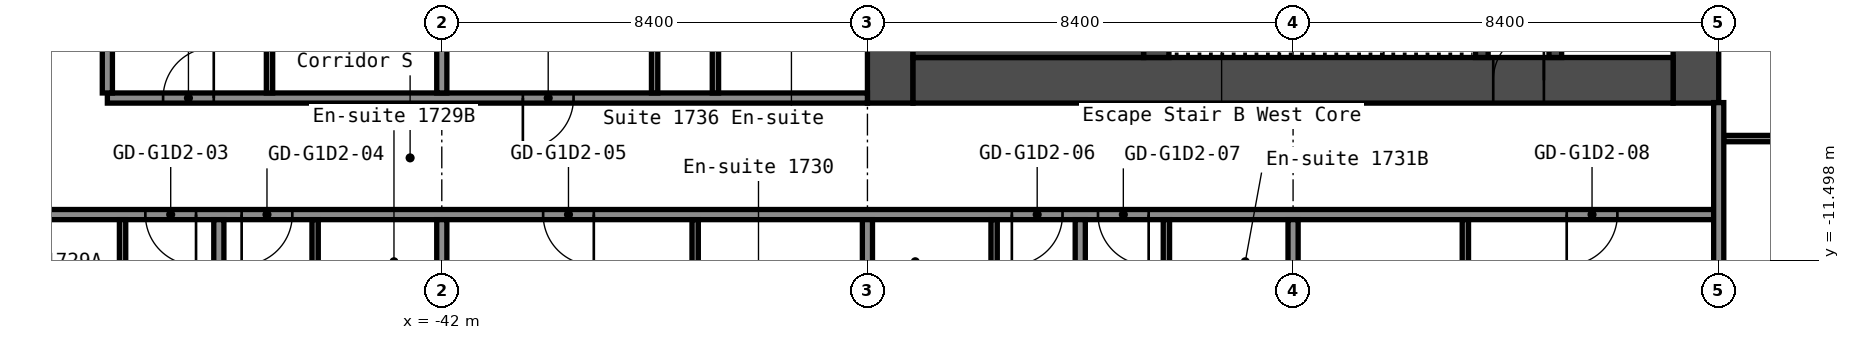
"""IFC4 building model, lengths in metres.
Left out: names, types, materials, properties, quantities, classifications, styles, units other than length and angle.
Written with IfcOpenShell. Run it as: python <this file> out.ifc"""

import sys

from ifc_helpers import new_model, si_unit, direction, frame, frame_2d, origin, place, context, subcontext, project, spatial, rectangle, extrude, element, fill, save


model = new_model("IFC4")
c1 = context("Model", 3, precision=1e-05, world=origin(), true_north=direction((0.0, 1.0)))
c2 = subcontext(c1, "Body", "Model", "MODEL_VIEW")
j1 = project(units=[si_unit("LENGTHUNIT", "METRE"), si_unit("PLANEANGLEUNIT", "RADIAN")], contexts=[c1])
p1 = place(None, origin())
s1 = spatial("IfcSite", under=j1, at=p1, CompositionType="ELEMENT")
p2 = place(p1, origin())
s2 = spatial("IfcBuilding", under=s1, at=p2, CompositionType="ELEMENT")
p3 = place(p2, frame((0.0, 0.0, 61.4)))
s3 = spatial("IfcBuildingStorey", under=s2, at=p3, CompositionType="ELEMENT", Elevation=61.4)
p4 = place(p3, frame((-17.25, -8.4, 0.0), z_axis=(0.0, 0.0, 1.0), x_axis=(0.0, 1.0, 0.0)))
e1 = element("IfcWall", 1, at=p4, inside=s3, PredefinedType="SHEAR", context=c2, shape_type="SweptSolid", body=[
    extrude(rectangle(XDim=16.8, YDim=0.9, at=frame_2d((8.4, 0.0))), origin(), (0.0, 0.0, 1.0), 2.9),
])
p5 = place(p4, frame((12.75, 0.0, 0.0)))
e2 = element("IfcOpeningElement", 2, at=p5, cuts=e1, PredefinedType="OPENING", context=c2, shape_type="SweptSolid", body=[
    extrude(rectangle(XDim=1.2, YDim=2.1, at=frame_2d((0.6, 1.05))), frame((0.0, 0.46, 0.0), z_axis=(0.0, -1.0, 0.0), x_axis=(1.0, 0.0, 0.0)), (0.0, 0.0, 1.0), 0.92),
])
p6 = place(p4, frame((2.85, 0.0, 0.0)))
e3 = element("IfcOpeningElement", 3, at=p6, cuts=e1, PredefinedType="OPENING", context=c2, shape_type="SweptSolid", body=[
    extrude(rectangle(XDim=1.2, YDim=2.1, at=frame_2d((0.6, 1.05))), frame((0.0, 0.46, 0.0), z_axis=(0.0, -1.0, 0.0), x_axis=(1.0, 0.0, 0.0)), (0.0, 0.0, 1.0), 0.92),
])
p7 = place(p3, frame((-33.15, -8.4, 0.0), z_axis=(0.0, 0.0, 1.0), x_axis=(0.0, 1.0, 0.0)))
e4 = element("IfcWall", 4, at=p7, inside=s3, PredefinedType="SHEAR", context=c2, shape_type="SweptSolid", body=[
    extrude(rectangle(XDim=16.8, YDim=0.9, at=frame_2d((8.4, 0.0))), origin(), (0.0, 0.0, 1.0), 2.9),
])
p8 = place(p3, frame((-32.7, -7.95, 0.0), z_axis=(0.0, 0.0, 1.0), x_axis=(1.0, 0.0, 0.0)))
e5 = element("IfcWall", 5, at=p8, inside=s3, PredefinedType="SHEAR", context=c2, shape_type="SweptSolid", body=[
    extrude(rectangle(XDim=15.0, YDim=0.9, at=frame_2d((7.5, 0.0))), origin(), (0.0, 0.0, 1.0), 2.9),
])
p9 = place(p8, frame((11.45, 0.0, 0.0)))
e6 = element("IfcOpeningElement", 6, at=p9, cuts=e5, PredefinedType="OPENING", context=c2, shape_type="SweptSolid", body=[
    extrude(rectangle(XDim=1.0, YDim=2.1, at=frame_2d((0.5, 1.05))), frame((0.0, 0.46, 0.0), z_axis=(0.0, -1.0, 0.0), x_axis=(1.0, 0.0, 0.0)), (0.0, 0.0, 1.0), 0.92),
])
p10 = place(p3, frame((-20.025, -7.5, 0.0), z_axis=(0.0, 0.0, 1.0), x_axis=(0.0, 1.0, 0.0)))
e7 = element("IfcWall", 7, at=p10, inside=s3, PredefinedType="SHEAR", context=c2, shape_type="SweptSolid", body=[
    extrude(rectangle(XDim=6.3, YDim=0.25, at=frame_2d((3.15, 0.0))), origin(), (0.0, 0.0, 1.0), 2.9),
])
p11 = place(p10, frame((2.4, 0.0, 0.0)))
e8 = element("IfcOpeningElement", 8, at=p11, cuts=e7, PredefinedType="OPENING", context=c2, shape_type="SweptSolid", body=[
    extrude(rectangle(XDim=1.0, YDim=2.1, at=frame_2d((0.5, 1.05))), frame((0.0, 0.135, 0.0), z_axis=(0.0, -1.0, 0.0), x_axis=(1.0, 0.0, 0.0)), (0.0, 0.0, 1.0), 0.27),
])
p12 = place(p3, frame((-21.475, -7.5, 0.0), z_axis=(0.0, 0.0, 1.0), x_axis=(0.0, 1.0, 0.0)))
e9 = element("IfcWall", 9, at=p12, inside=s3, PredefinedType="SHEAR", context=c2, shape_type="SweptSolid", body=[
    extrude(rectangle(XDim=3.75, YDim=0.25, at=frame_2d((1.875, 0.0))), origin(), (0.0, 0.0, 1.0), 2.9),
])
p13 = place(p12, frame((1.3, 0.0, 0.0)))
e10 = element("IfcOpeningElement", 10, at=p13, cuts=e9, PredefinedType="OPENING", context=c2, shape_type="SweptSolid", body=[
    extrude(rectangle(XDim=1.2, YDim=2.1, at=frame_2d((0.6, 1.05))), frame((0.0, 0.135, 0.0), z_axis=(0.0, -1.0, 0.0), x_axis=(1.0, 0.0, 0.0)), (0.0, 0.0, 1.0), 0.27),
])
p14 = place(p3, frame((-27.9, -7.5, 0.0), z_axis=(0.0, 0.0, 1.0), x_axis=(0.0, 1.0, 0.0)))
e11 = element("IfcWall", 11, at=p14, inside=s3, PredefinedType="SHEAR", context=c2, shape_type="SweptSolid", body=[
    extrude(rectangle(XDim=3.75, YDim=0.5, at=frame_2d((1.875, 0.0))), origin(), (0.0, 0.0, 1.0), 2.9),
])
p15 = place(p3, frame((-32.7, -6.75, 0.0), z_axis=(0.0, 0.0, 1.0), x_axis=(1.0, 0.0, 0.0)))
e12 = element("IfcWall", 12, at=p15, inside=s3, PredefinedType="SHEAR", context=c2, shape_type="SweptSolid", body=[
    extrude(rectangle(XDim=4.55, YDim=1.5, at=frame_2d((2.275, 0.0))), origin(), (0.0, 0.0, 1.0), 2.9),
])
p16 = place(p3, frame((-51.1, -10.6, 0.0), z_axis=(0.0, 0.0, 1.0), x_axis=(1.0, 0.0, 0.0)))
e13 = element("IfcWall", 13, at=p16, inside=s3, PredefinedType="PARTITIONING", context=c2, shape_type="SweptSolid", body=[
    extrude(rectangle(XDim=34.3, YDim=0.2, at=frame_2d((17.15, 0.0))), origin(), (0.0, 0.0, 1.0), 2.9),
])
p17 = place(p16, frame((3.25, 0.0, 0.0)))
e14 = element("IfcOpeningElement", 14, at=p17, cuts=e13, PredefinedType="OPENING", context=c2, shape_type="SweptSolid", body=[
    extrude(rectangle(XDim=1.0, YDim=2.1, at=frame_2d((0.5, 1.05))), frame((0.0, 0.11, 0.0), z_axis=(0.0, -1.0, 0.0), x_axis=(1.0, 0.0, 0.0)), (0.0, 0.0, 1.0), 0.22),
])
p18 = place(p16, frame((5.15, 0.0, 0.0)))
e15 = element("IfcOpeningElement", 15, at=p18, cuts=e13, PredefinedType="OPENING", context=c2, shape_type="SweptSolid", body=[
    extrude(rectangle(XDim=1.0, YDim=2.1, at=frame_2d((0.5, 1.05))), frame((0.0, 0.11, 0.0), z_axis=(0.0, -1.0, 0.0), x_axis=(1.0, 0.0, 0.0)), (0.0, 0.0, 1.0), 0.22),
])
p19 = place(p16, frame((11.1, 0.0, 0.0)))
e16 = element("IfcOpeningElement", 16, at=p19, cuts=e13, PredefinedType="OPENING", context=c2, shape_type="SweptSolid", body=[
    extrude(rectangle(XDim=1.0, YDim=2.1, at=frame_2d((0.5, 1.05))), frame((0.0, 0.11, 0.0), z_axis=(0.0, -1.0, 0.0), x_axis=(1.0, 0.0, 0.0)), (0.0, 0.0, 1.0), 0.22),
])
p20 = place(p16, frame((20.35, 0.0, 0.0)))
e17 = element("IfcOpeningElement", 17, at=p20, cuts=e13, PredefinedType="OPENING", context=c2, shape_type="SweptSolid", body=[
    extrude(rectangle(XDim=1.0, YDim=2.1, at=frame_2d((0.5, 1.05))), frame((0.0, 0.11, 0.0), z_axis=(0.0, -1.0, 0.0), x_axis=(1.0, 0.0, 0.0)), (0.0, 0.0, 1.0), 0.22),
])
p21 = place(p16, frame((22.05, 0.0, 0.0)))
e18 = element("IfcOpeningElement", 18, at=p21, cuts=e13, PredefinedType="OPENING", context=c2, shape_type="SweptSolid", body=[
    extrude(rectangle(XDim=1.0, YDim=2.1, at=frame_2d((0.5, 1.05))), frame((0.0, 0.11, 0.0), z_axis=(0.0, -1.0, 0.0), x_axis=(1.0, 0.0, 0.0)), (0.0, 0.0, 1.0), 0.22),
])
p22 = place(p16, frame((31.3, 0.0, 0.0)))
e19 = element("IfcOpeningElement", 19, at=p22, cuts=e13, PredefinedType="OPENING", context=c2, shape_type="SweptSolid", body=[
    extrude(rectangle(XDim=1.0, YDim=2.1, at=frame_2d((0.5, 1.05))), frame((0.0, 0.11, 0.0), z_axis=(0.0, -1.0, 0.0), x_axis=(1.0, 0.0, 0.0)), (0.0, 0.0, 1.0), 0.22),
])
p23 = place(p3, frame((-16.7, -9.1, 0.0), z_axis=(0.0, 0.0, 1.0), x_axis=(1.0, 0.0, 0.0)))
e20 = element("IfcWall", 20, at=p23, inside=s3, PredefinedType="PARTITIONING", context=c2, shape_type="SweptSolid", body=[
    extrude(rectangle(XDim=2.337, YDim=0.125, at=frame_2d((1.169, 0.0))), origin(), (0.0, 0.0, 1.0), 2.9),
])
p24 = place(p3, frame((-48.6, -8.3, 0.0), z_axis=(0.0, 0.0, 1.0), x_axis=(1.0, 0.0, 0.0)))
e21 = element("IfcWall", 21, at=p24, inside=s3, PredefinedType="PARTITIONING", context=c2, shape_type="SweptSolid", body=[
    extrude(rectangle(XDim=15.0, YDim=0.2, at=frame_2d((7.5, 0.0))), origin(), (0.0, 0.0, 1.0), 2.9),
])
p25 = place(p24, frame((1.1, 0.0, 0.0)))
e22 = element("IfcOpeningElement", 22, at=p25, cuts=e21, PredefinedType="OPENING", context=c2, shape_type="SweptSolid", body=[
    extrude(rectangle(XDim=1.0, YDim=2.1, at=frame_2d((0.5, 1.05))), frame((0.0, 0.11, 0.0), z_axis=(0.0, -1.0, 0.0), x_axis=(1.0, 0.0, 0.0)), (0.0, 0.0, 1.0), 0.22),
])
p26 = place(p24, frame((8.2, 0.0, 0.0)))
e23 = element("IfcOpeningElement", 23, at=p26, cuts=e21, PredefinedType="OPENING", context=c2, shape_type="SweptSolid", body=[
    extrude(rectangle(XDim=1.0, YDim=2.1, at=frame_2d((0.5, 1.05))), frame((0.0, 0.11, 0.0), z_axis=(0.0, -1.0, 0.0), x_axis=(1.0, 0.0, 0.0)), (0.0, 0.0, 1.0), 0.22),
])
p27 = place(p3, frame((-48.6, -8.2, 0.0), z_axis=(0.0, 0.0, 1.0), x_axis=(0.0, 1.0, 0.0)))
e24 = element("IfcWall", 24, at=p27, inside=s3, PredefinedType="PARTITIONING", context=c2, shape_type="SweptSolid", body=[
    extrude(rectangle(XDim=16.4, YDim=0.2, at=frame_2d((8.2, 0.0))), origin(), (0.0, 0.0, 1.0), 2.9),
])
p28 = place(p3, frame((-48.3, -13.6, 0.0), z_axis=(0.0, 0.0, 1.0), x_axis=(0.0, 1.0, 0.0)))
e25 = element("IfcWall", 25, at=p28, inside=s3, PredefinedType="PARTITIONING", context=c2, shape_type="SweptSolid", body=[
    extrude(rectangle(XDim=2.9, YDim=0.125, at=frame_2d((1.45, 0.0))), origin(), (0.0, 0.0, 1.0), 2.9),
])
p29 = place(p28, frame((0.6, 0.0, 0.0)))
e26 = element("IfcOpeningElement", 26, at=p29, cuts=e25, PredefinedType="OPENING", context=c2, shape_type="SweptSolid", body=[
    extrude(rectangle(XDim=0.8, YDim=2.1, at=frame_2d((0.4, 1.05))), frame((0.0, 0.073, 0.0), z_axis=(0.0, -1.0, 0.0), x_axis=(1.0, 0.0, 0.0)), (0.0, 0.0, 1.0), 0.145),
])
p30 = place(p3, frame((-46.4, -20.3, 0.0), z_axis=(0.0, 0.0, 1.0), x_axis=(0.0, 1.0, 0.0)))
e27 = element("IfcWall", 27, at=p30, inside=s3, PredefinedType="PARTITIONING", context=c2, shape_type="SweptSolid", body=[
    extrude(rectangle(XDim=9.6, YDim=0.2, at=frame_2d((4.8, 0.0))), origin(), (0.0, 0.0, 1.0), 2.9),
])
p31 = place(p3, frame((-45.4, -8.2, 0.0), z_axis=(0.0, 0.0, 1.0), x_axis=(0.0, 1.0, 0.0)))
e28 = element("IfcWall", 28, at=p31, inside=s3, PredefinedType="PARTITIONING", context=c2, shape_type="SweptSolid", body=[
    extrude(rectangle(XDim=3.3, YDim=0.125, at=frame_2d((1.65, 0.0))), origin(), (0.0, 0.0, 1.0), 2.9),
])
p32 = place(p3, frame((-44.5, -13.6, 0.0), z_axis=(0.0, 0.0, 1.0), x_axis=(0.0, 1.0, 0.0)))
e29 = element("IfcWall", 29, at=p32, inside=s3, PredefinedType="PARTITIONING", context=c2, shape_type="SweptSolid", body=[
    extrude(rectangle(XDim=2.9, YDim=0.125, at=frame_2d((1.45, 0.0))), origin(), (0.0, 0.0, 1.0), 2.9),
])
p33 = place(p32, frame((0.6, 0.0, 0.0)))
e30 = element("IfcOpeningElement", 30, at=p33, cuts=e29, PredefinedType="OPENING", context=c2, shape_type="SweptSolid", body=[
    extrude(rectangle(XDim=0.8, YDim=2.1, at=frame_2d((0.4, 1.05))), frame((0.0, 0.073, 0.0), z_axis=(0.0, -1.0, 0.0), x_axis=(1.0, 0.0, 0.0)), (0.0, 0.0, 1.0), 0.145),
])
p34 = place(p3, frame((-42.0, -20.3, 0.0), z_axis=(0.0, 0.0, 1.0), x_axis=(0.0, 1.0, 0.0)))
e31 = element("IfcWall", 31, at=p34, inside=s3, PredefinedType="PARTITIONING", context=c2, shape_type="SweptSolid", body=[
    extrude(rectangle(XDim=9.6, YDim=0.2, at=frame_2d((4.8, 0.0))), origin(), (0.0, 0.0, 1.0), 2.9),
])
p35 = place(p3, frame((-42.0, -8.2, 0.0), z_axis=(0.0, 0.0, 1.0), x_axis=(0.0, 1.0, 0.0)))
e32 = element("IfcWall", 32, at=p35, inside=s3, PredefinedType="PARTITIONING", context=c2, shape_type="SweptSolid", body=[
    extrude(rectangle(XDim=16.4, YDim=0.2, at=frame_2d((8.2, 0.0))), origin(), (0.0, 0.0, 1.0), 2.9),
])
p36 = place(p3, frame((-37.8, -8.2, 0.0), z_axis=(0.0, 0.0, 1.0), x_axis=(0.0, 1.0, 0.0)))
e33 = element("IfcWall", 33, at=p36, inside=s3, PredefinedType="PARTITIONING", context=c2, shape_type="SweptSolid", body=[
    extrude(rectangle(XDim=8.1, YDim=0.125, at=frame_2d((4.05, 0.0))), origin(), (0.0, 0.0, 1.0), 2.9),
])
p37 = place(p36, frame((4.05, 0.0, 0.0)))
e34 = element("IfcOpeningElement", 34, at=p37, cuts=e33, PredefinedType="OPENING", context=c2, shape_type="SweptSolid", body=[
    extrude(rectangle(XDim=0.9, YDim=2.1, at=frame_2d((0.45, 1.05))), frame((0.0, 0.073, 0.0), z_axis=(0.0, -1.0, 0.0), x_axis=(1.0, 0.0, 0.0)), (0.0, 0.0, 1.0), 0.145),
])
p38 = place(p3, frame((-37.0, -14.0, 0.0), z_axis=(0.0, 0.0, 1.0), x_axis=(0.0, 1.0, 0.0)))
e35 = element("IfcWall", 35, at=p38, inside=s3, PredefinedType="PARTITIONING", context=c2, shape_type="SweptSolid", body=[
    extrude(rectangle(XDim=3.3, YDim=0.125, at=frame_2d((1.65, 0.0))), origin(), (0.0, 0.0, 1.0), 2.9),
])
p39 = place(p3, frame((-36.6, -8.2, 0.0), z_axis=(0.0, 0.0, 1.0), x_axis=(0.0, 1.0, 0.0)))
e36 = element("IfcWall", 36, at=p39, inside=s3, PredefinedType="PARTITIONING", context=c2, shape_type="SweptSolid", body=[
    extrude(rectangle(XDim=3.1, YDim=0.125, at=frame_2d((1.55, 0.0))), origin(), (0.0, 0.0, 1.0), 2.9),
])
p40 = place(p3, frame((-33.6, -20.3, 0.0), z_axis=(0.0, 0.0, 1.0), x_axis=(0.0, 1.0, 0.0)))
e37 = element("IfcWall", 37, at=p40, inside=s3, PredefinedType="PARTITIONING", context=c2, shape_type="SweptSolid", body=[
    extrude(rectangle(XDim=9.6, YDim=0.2, at=frame_2d((4.8, 0.0))), origin(), (0.0, 0.0, 1.0), 2.9),
])
p41 = place(p3, frame((-31.1, -13.6, 0.0), z_axis=(0.0, 0.0, 1.0), x_axis=(0.0, 1.0, 0.0)))
e38 = element("IfcWall", 38, at=p41, inside=s3, PredefinedType="PARTITIONING", context=c2, shape_type="SweptSolid", body=[
    extrude(rectangle(XDim=2.9, YDim=0.125, at=frame_2d((1.45, 0.0))), origin(), (0.0, 0.0, 1.0), 2.9),
])
p42 = place(p41, frame((0.6, 0.0, 0.0)))
e39 = element("IfcOpeningElement", 39, at=p42, cuts=e38, PredefinedType="OPENING", context=c2, shape_type="SweptSolid", body=[
    extrude(rectangle(XDim=0.8, YDim=2.1, at=frame_2d((0.4, 1.05))), frame((0.0, 0.073, 0.0), z_axis=(0.0, -1.0, 0.0), x_axis=(1.0, 0.0, 0.0)), (0.0, 0.0, 1.0), 0.145),
])
p43 = place(p3, frame((-29.4, -20.3, 0.0), z_axis=(0.0, 0.0, 1.0), x_axis=(0.0, 1.0, 0.0)))
e40 = element("IfcWall", 40, at=p43, inside=s3, PredefinedType="PARTITIONING", context=c2, shape_type="SweptSolid", body=[
    extrude(rectangle(XDim=9.6, YDim=0.2, at=frame_2d((4.8, 0.0))), origin(), (0.0, 0.0, 1.0), 2.9),
])
p44 = place(p3, frame((-27.7, -13.6, 0.0), z_axis=(0.0, 0.0, 1.0), x_axis=(0.0, 1.0, 0.0)))
e41 = element("IfcWall", 41, at=p44, inside=s3, PredefinedType="PARTITIONING", context=c2, shape_type="SweptSolid", body=[
    extrude(rectangle(XDim=2.9, YDim=0.125, at=frame_2d((1.45, 0.0))), origin(), (0.0, 0.0, 1.0), 2.9),
])
p45 = place(p44, frame((0.6, 0.0, 0.0)))
e42 = element("IfcOpeningElement", 42, at=p45, cuts=e41, PredefinedType="OPENING", context=c2, shape_type="SweptSolid", body=[
    extrude(rectangle(XDim=0.8, YDim=2.1, at=frame_2d((0.4, 1.05))), frame((0.0, 0.073, 0.0), z_axis=(0.0, -1.0, 0.0), x_axis=(1.0, 0.0, 0.0)), (0.0, 0.0, 1.0), 0.145),
])
p46 = place(p3, frame((-25.2, -20.3, 0.0), z_axis=(0.0, 0.0, 1.0), x_axis=(0.0, 1.0, 0.0)))
e43 = element("IfcWall", 43, at=p46, inside=s3, PredefinedType="PARTITIONING", context=c2, shape_type="SweptSolid", body=[
    extrude(rectangle(XDim=9.6, YDim=0.2, at=frame_2d((4.8, 0.0))), origin(), (0.0, 0.0, 1.0), 2.9),
])
p47 = place(p3, frame((-21.8, -14.0, 0.0), z_axis=(0.0, 0.0, 1.0), x_axis=(0.0, 1.0, 0.0)))
e44 = element("IfcWall", 44, at=p47, inside=s3, PredefinedType="PARTITIONING", context=c2, shape_type="SweptSolid", body=[
    extrude(rectangle(XDim=3.3, YDim=0.125, at=frame_2d((1.65, 0.0))), origin(), (0.0, 0.0, 1.0), 2.9),
])
p48 = place(p3, frame((-16.8, -20.3, 0.0), z_axis=(0.0, 0.0, 1.0), x_axis=(0.0, 1.0, 0.0)))
e45 = element("IfcWall", 45, at=p48, inside=s3, PredefinedType="PARTITIONING", context=c2, shape_type="SweptSolid", body=[
    extrude(rectangle(XDim=11.91, YDim=0.2, at=frame_2d((5.955, 0.0))), origin(), (0.0, 0.0, 1.0), 2.9),
])
p49 = place(p9, origin())
e46 = element("IfcDoor", 46, at=p49, inside=s3, OperationType="SINGLE_SWING_LEFT", PredefinedType="DOOR", context=c2, shape_type="SweptSolid", body=[
    extrude(rectangle(XDim=1.0, YDim=2.1, at=frame_2d((0.5, 1.05))), frame((0.0, 0.025, 0.0), z_axis=(0.0, -1.0, 0.0), x_axis=(1.0, 0.0, 0.0)), (0.0, 0.0, 1.0), 0.05),
])
fill(e6, e46)
p50 = place(p17, origin())
e47 = element("IfcDoor", 47, at=p50, inside=s3, OperationType="SINGLE_SWING_RIGHT", PredefinedType="DOOR", context=c2, shape_type="SweptSolid", body=[
    extrude(rectangle(XDim=1.0, YDim=2.1, at=frame_2d((0.5, 1.05))), frame((0.0, 0.025, 0.0), z_axis=(0.0, -1.0, 0.0), x_axis=(1.0, 0.0, 0.0)), (0.0, 0.0, 1.0), 0.05),
])
fill(e14, e47)
p51 = place(p18, origin())
e48 = element("IfcDoor", 48, at=p51, inside=s3, OperationType="SINGLE_SWING_LEFT", PredefinedType="DOOR", context=c2, shape_type="SweptSolid", body=[
    extrude(rectangle(XDim=1.0, YDim=2.1, at=frame_2d((0.5, 1.05))), frame((0.0, 0.025, 0.0), z_axis=(0.0, -1.0, 0.0), x_axis=(1.0, 0.0, 0.0)), (0.0, 0.0, 1.0), 0.05),
])
fill(e15, e48)
p52 = place(p19, origin())
e49 = element("IfcDoor", 49, at=p52, inside=s3, OperationType="SINGLE_SWING_RIGHT", PredefinedType="DOOR", context=c2, shape_type="SweptSolid", body=[
    extrude(rectangle(XDim=1.0, YDim=2.1, at=frame_2d((0.5, 1.05))), frame((0.0, 0.025, 0.0), z_axis=(0.0, -1.0, 0.0), x_axis=(1.0, 0.0, 0.0)), (0.0, 0.0, 1.0), 0.05),
])
fill(e16, e49)
p53 = place(p20, origin())
e50 = element("IfcDoor", 50, at=p53, inside=s3, OperationType="SINGLE_SWING_LEFT", PredefinedType="DOOR", context=c2, shape_type="SweptSolid", body=[
    extrude(rectangle(XDim=1.0, YDim=2.1, at=frame_2d((0.5, 1.05))), frame((0.0, 0.025, 0.0), z_axis=(0.0, -1.0, 0.0), x_axis=(1.0, 0.0, 0.0)), (0.0, 0.0, 1.0), 0.05),
])
fill(e17, e50)
p54 = place(p21, origin())
e51 = element("IfcDoor", 51, at=p54, inside=s3, OperationType="SINGLE_SWING_RIGHT", PredefinedType="DOOR", context=c2, shape_type="SweptSolid", body=[
    extrude(rectangle(XDim=1.0, YDim=2.1, at=frame_2d((0.5, 1.05))), frame((0.0, 0.025, 0.0), z_axis=(0.0, -1.0, 0.0), x_axis=(1.0, 0.0, 0.0)), (0.0, 0.0, 1.0), 0.05),
])
fill(e18, e51)
p55 = place(p22, origin())
e52 = element("IfcDoor", 52, at=p55, inside=s3, OperationType="SINGLE_SWING_LEFT", PredefinedType="DOOR", context=c2, shape_type="SweptSolid", body=[
    extrude(rectangle(XDim=1.0, YDim=2.1, at=frame_2d((0.5, 1.05))), frame((0.0, 0.025, 0.0), z_axis=(0.0, -1.0, 0.0), x_axis=(1.0, 0.0, 0.0)), (0.0, 0.0, 1.0), 0.05),
])
fill(e19, e52)
p56 = place(p25, origin())
e53 = element("IfcDoor", 53, at=p56, inside=s3, OperationType="SINGLE_SWING_LEFT", PredefinedType="DOOR", context=c2, shape_type="SweptSolid", body=[
    extrude(rectangle(XDim=1.0, YDim=2.1, at=frame_2d((0.5, 1.05))), frame((0.0, 0.025, 0.0), z_axis=(0.0, -1.0, 0.0), x_axis=(1.0, 0.0, 0.0)), (0.0, 0.0, 1.0), 0.05),
])
fill(e22, e53)
p57 = place(p26, origin())
e54 = element("IfcDoor", 54, at=p57, inside=s3, OperationType="SINGLE_SWING_LEFT", PredefinedType="DOOR", context=c2, shape_type="SweptSolid", body=[
    extrude(rectangle(XDim=1.0, YDim=2.1, at=frame_2d((0.5, 1.05))), frame((0.0, 0.025, 0.0), z_axis=(0.0, -1.0, 0.0), x_axis=(1.0, 0.0, 0.0)), (0.0, 0.0, 1.0), 0.05),
])
fill(e23, e54)
save(model, sys.argv[1])
